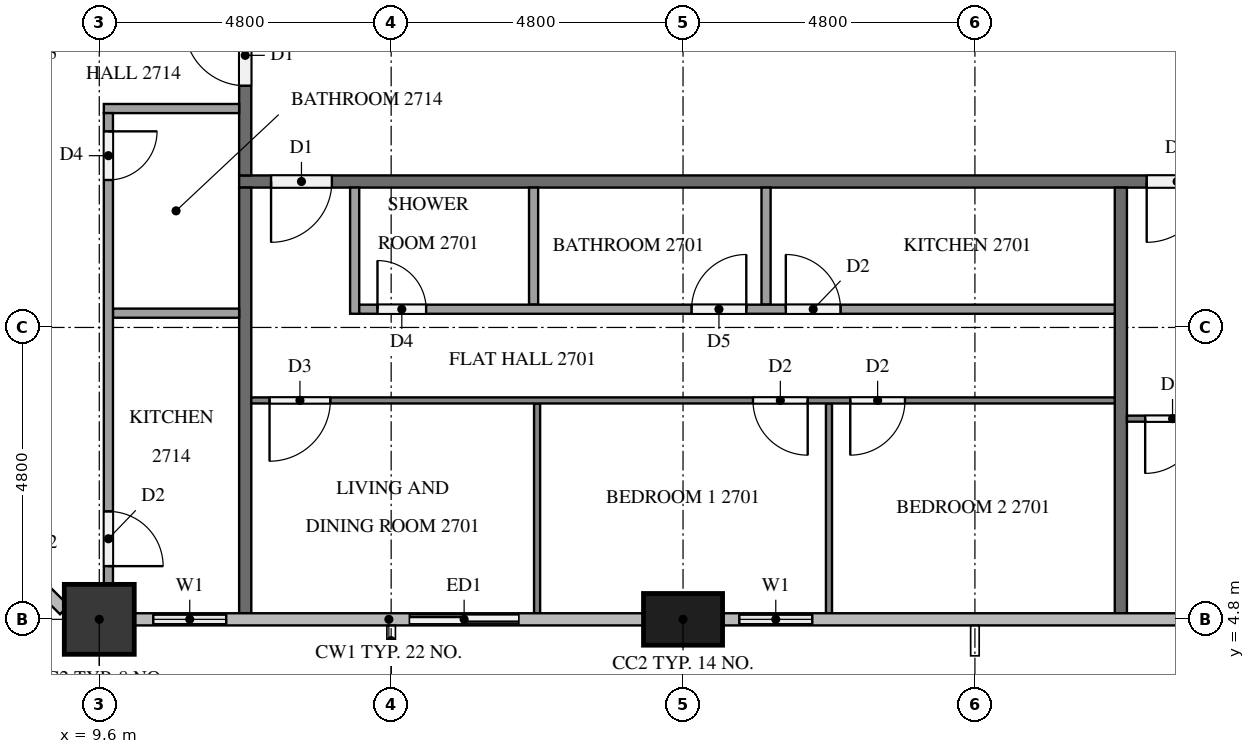
"""IFC4 building model, lengths in metres.
Left out: names, types, materials, properties, quantities, classifications, styles, units other than length and angle.
Written with IfcOpenShell. Run it as: python <this file> out.ifc"""

import sys

from ifc_helpers import new_model, si_unit, direction, frame, frame_2d, origin, origin_2d, place, context, subcontext, project, spatial, rectangle, extrude, element, fill, save


model = new_model("IFC4")
c1 = context("Model", 3, precision=1e-05, world=origin(), true_north=direction((0.0, 1.0)))
c2 = subcontext(c1, "Body", "Model", "MODEL_VIEW")
j1 = project(units=[si_unit("LENGTHUNIT", "METRE"), si_unit("PLANEANGLEUNIT", "RADIAN")], contexts=[c1])
p1 = place(None, origin())
s1 = spatial("IfcSite", under=j1, at=p1, CompositionType="ELEMENT")
p2 = place(p1, origin())
s2 = spatial("IfcBuilding", under=s1, at=p2, CompositionType="ELEMENT")
p3 = place(p2, frame((0.0, 0.0, 106.7)))
s3 = spatial("IfcBuildingStorey", under=s2, at=p3, CompositionType="ELEMENT", Elevation=106.7)
p4 = place(p3, frame((9.6, 4.8, 0.0), z_axis=(0.0, 0.0, 1.0), x_axis=(1.0, 0.0, 0.0)))
e1 = element("IfcColumn", 1, at=p4, inside=s3, PredefinedType="COLUMN", context=c2, shape_type="SweptSolid", body=[
    extrude(rectangle(XDim=1.15, YDim=1.15, at=origin_2d()), origin(), (0.0, 0.0, 1.0), 3.2),
])
p5 = place(p3, frame((19.2, 4.8, 0.0), z_axis=(0.0, 0.0, 1.0), x_axis=(1.0, 0.0, 0.0)))
e2 = element("IfcColumn", 2, at=p5, inside=s3, PredefinedType="COLUMN", context=c2, shape_type="SweptSolid", body=[
    extrude(rectangle(XDim=1.3, YDim=0.85, at=origin_2d()), origin(), (0.0, 0.0, 1.0), 3.2),
])
p6 = place(p3, frame((10.175, 4.8, 0.0), z_axis=(0.0, 0.0, 1.0), x_axis=(1.0, 0.0, 0.0)))
e3 = element("IfcWall", 3, at=p6, inside=s3, PredefinedType="SOLIDWALL", context=c2, shape_type="SweptSolid", body=[
    extrude(rectangle(XDim=1.825, YDim=0.15, at=frame_2d((0.913, 0.0))), origin(), (0.0, 0.0, 1.0), 3.2),
])
p7 = place(p6, frame((0.312, 0.0, 0.9)))
e4 = element("IfcOpeningElement", 4, at=p7, cuts=e3, PredefinedType="OPENING", context=c2, shape_type="SweptSolid", body=[
    extrude(rectangle(XDim=1.2, YDim=1.4, at=frame_2d((0.6, 0.7))), frame((0.0, 0.085, 0.0), z_axis=(0.0, -1.0, 0.0), x_axis=(1.0, 0.0, 0.0)), (0.0, 0.0, 1.0), 0.17),
])
p8 = place(p3, frame((14.4, 4.8, 0.0), z_axis=(0.0, 0.0, 1.0), x_axis=(1.0, 0.0, 0.0)))
e5 = element("IfcWall", 5, at=p8, inside=s3, PredefinedType="SOLIDWALL", context=c2, shape_type="SweptSolid", body=[
    extrude(rectangle(XDim=2.4, YDim=0.15, at=frame_2d((1.2, 0.0))), origin(), (0.0, 0.0, 1.0), 3.2),
])
p9 = place(p8, frame((0.3, 0.0, 0.0)))
e6 = element("IfcOpeningElement", 6, at=p9, cuts=e5, PredefinedType="OPENING", context=c2, shape_type="SweptSolid", body=[
    extrude(rectangle(XDim=1.8, YDim=2.4, at=frame_2d((0.9, 1.2))), frame((0.0, 0.085, 0.0), z_axis=(0.0, -1.0, 0.0), x_axis=(1.0, 0.0, 0.0)), (0.0, 0.0, 1.0), 0.17),
])
p10 = place(p3, frame((19.85, 4.8, 0.0), z_axis=(0.0, 0.0, 1.0), x_axis=(1.0, 0.0, 0.0)))
e7 = element("IfcWall", 7, at=p10, inside=s3, PredefinedType="SOLIDWALL", context=c2, shape_type="SweptSolid", body=[
    extrude(rectangle(XDim=1.75, YDim=0.15, at=frame_2d((0.875, 0.0))), origin(), (0.0, 0.0, 1.0), 3.2),
])
p11 = place(p10, frame((0.275, 0.0, 0.9)))
e8 = element("IfcOpeningElement", 8, at=p11, cuts=e7, PredefinedType="OPENING", context=c2, shape_type="SweptSolid", body=[
    extrude(rectangle(XDim=1.2, YDim=1.4, at=frame_2d((0.6, 0.7))), frame((0.0, 0.085, 0.0), z_axis=(0.0, -1.0, 0.0), x_axis=(1.0, 0.0, 0.0)), (0.0, 0.0, 1.0), 0.17),
])
p12 = place(p3, frame((50.5, 12.0, 0.0), z_axis=(0.0, 0.0, 1.0), x_axis=(-1.0, 0.0, 0.0)))
e9 = element("IfcWall", 9, at=p12, inside=s3, PredefinedType="PARTITIONING", context=c2, shape_type="SweptSolid", body=[
    extrude(rectangle(XDim=38.6, YDim=0.2, at=frame_2d((19.3, 0.0))), origin(), (0.0, 0.0, 1.0), 3.2),
])
p13 = place(p12, frame((37.075, 0.0, 0.0)))
e10 = element("IfcOpeningElement", 10, at=p13, cuts=e9, PredefinedType="OPENING", context=c2, shape_type="SweptSolid", body=[
    extrude(rectangle(XDim=1.0, YDim=2.1, at=frame_2d((0.5, 1.05))), frame((0.0, 0.11, 0.0), z_axis=(0.0, -1.0, 0.0), x_axis=(1.0, 0.0, 0.0)), (0.0, 0.0, 1.0), 0.22),
])
p14 = place(p12, frame((22.675, 0.0, 0.0)))
e11 = element("IfcOpeningElement", 11, at=p14, cuts=e9, PredefinedType="OPENING", context=c2, shape_type="SweptSolid", body=[
    extrude(rectangle(XDim=1.0, YDim=2.1, at=frame_2d((0.5, 1.05))), frame((0.0, 0.11, 0.0), z_axis=(0.0, -1.0, 0.0), x_axis=(1.0, 0.0, 0.0)), (0.0, 0.0, 1.0), 0.22),
])
p15 = place(p12, frame((0.525, 0.0, 0.0)))
e12 = element("IfcOpeningElement", 12, at=p15, cuts=e9, PredefinedType="OPENING", context=c2, shape_type="SweptSolid", body=[
    extrude(rectangle(XDim=1.0, YDim=2.1, at=frame_2d((0.5, 1.05))), frame((0.0, 0.11, 0.0), z_axis=(0.0, -1.0, 0.0), x_axis=(1.0, 0.0, 0.0)), (0.0, 0.0, 1.0), 0.22),
])
p16 = place(p3, frame((12.0, 12.1, 0.0), z_axis=(0.0, 0.0, 1.0), x_axis=(0.0, 1.0, 0.0)))
e13 = element("IfcWall", 13, at=p16, inside=s3, PredefinedType="PARTITIONING", context=c2, shape_type="SweptSolid", body=[
    extrude(rectangle(XDim=2.8, YDim=0.2, at=frame_2d((1.4, 0.0))), origin(), (0.0, 0.0, 1.0), 3.2),
])
p17 = place(p16, frame((1.475, 0.0, 0.0)))
e14 = element("IfcOpeningElement", 14, at=p17, cuts=e13, PredefinedType="OPENING", context=c2, shape_type="SweptSolid", body=[
    extrude(rectangle(XDim=1.0, YDim=2.1, at=frame_2d((0.5, 1.05))), frame((0.0, 0.11, 0.0), z_axis=(0.0, -1.0, 0.0), x_axis=(1.0, 0.0, 0.0)), (0.0, 0.0, 1.0), 0.22),
])
for number, where, z_axis, x_axis in (
    (15, (26.4, 11.9, 0.0), (0.0, 0.0, 1.0), (0.0, -1.0, 0.0)),
    (16, (12.0, 4.9, 0.0), (0.0, 0.0, 1.0), (0.0, 1.0, 0.0)),
):
    element("IfcWall", number, at=place(p3, frame(where, z_axis=z_axis, x_axis=x_axis)), inside=s3, PredefinedType="PARTITIONING", context=c2, shape_type="SweptSolid", body=[
        extrude(rectangle(XDim=7.0, YDim=0.2, at=frame_2d((3.5, 0.0))), origin(), (0.0, 0.0, 1.0), 3.2),
    ])
for number, where, z_axis, x_axis in (
    (17, (16.8, 8.35, 0.0), (0.0, 0.0, 1.0), (0.0, -1.0, 0.0)),
    (18, (21.6, 8.35, 0.0), (0.0, 0.0, 1.0), (0.0, -1.0, 0.0)),
):
    element("IfcWall", number, at=place(p3, frame(where, z_axis=z_axis, x_axis=x_axis)), inside=s3, PredefinedType="PARTITIONING", context=c2, shape_type="SweptSolid", body=[
        extrude(rectangle(XDim=3.45, YDim=0.1, at=frame_2d((1.725, 0.0))), origin(), (0.0, 0.0, 1.0), 3.2),
    ])
p18 = place(p3, frame((26.3, 8.4, 0.0), z_axis=(0.0, 0.0, 1.0), x_axis=(-1.0, 0.0, 0.0)))
e19 = element("IfcWall", 19, at=p18, inside=s3, PredefinedType="PARTITIONING", context=c2, shape_type="SweptSolid", body=[
    extrude(rectangle(XDim=14.2, YDim=0.1, at=frame_2d((7.1, 0.0))), origin(), (0.0, 0.0, 1.0), 3.2),
])
p19 = place(p18, frame((12.9, 0.0, 0.0)))
e20 = element("IfcOpeningElement", 20, at=p19, cuts=e19, PredefinedType="OPENING", context=c2, shape_type="SweptSolid", body=[
    extrude(rectangle(XDim=1.0, YDim=2.1, at=frame_2d((0.5, 1.05))), frame((0.0, 0.06, 0.0), z_axis=(0.0, -1.0, 0.0), x_axis=(1.0, 0.0, 0.0)), (0.0, 0.0, 1.0), 0.12),
])
p20 = place(p18, frame((5.05, 0.0, 0.0)))
e21 = element("IfcOpeningElement", 21, at=p20, cuts=e19, PredefinedType="OPENING", context=c2, shape_type="SweptSolid", body=[
    extrude(rectangle(XDim=0.9, YDim=2.1, at=frame_2d((0.45, 1.05))), frame((0.0, 0.06, 0.0), z_axis=(0.0, -1.0, 0.0), x_axis=(1.0, 0.0, 0.0)), (0.0, 0.0, 1.0), 0.12),
])
p21 = place(p18, frame((3.45, 0.0, 0.0)))
e22 = element("IfcOpeningElement", 22, at=p21, cuts=e19, PredefinedType="OPENING", context=c2, shape_type="SweptSolid", body=[
    extrude(rectangle(XDim=0.9, YDim=2.1, at=frame_2d((0.45, 1.05))), frame((0.0, 0.06, 0.0), z_axis=(0.0, -1.0, 0.0), x_axis=(1.0, 0.0, 0.0)), (0.0, 0.0, 1.0), 0.12),
])
for number, where, z_axis, x_axis in (
    (23, (16.742, 11.9, 0.0), (0.0, 0.0, 1.0), (0.0, -1.0, 0.0)),
    (24, (20.565, 11.9, 0.0), (0.0, 0.0, 1.0), (0.0, -1.0, 0.0)),
):
    element("IfcWall", number, at=place(p3, frame(where, z_axis=z_axis, x_axis=x_axis)), inside=s3, PredefinedType="PARTITIONING", context=c2, shape_type="SweptSolid", body=[
        extrude(rectangle(XDim=1.925, YDim=0.15, at=frame_2d((0.962, 0.0))), origin(), (0.0, 0.0, 1.0), 3.2),
    ])
p22 = place(p3, frame((13.8, 11.9, 0.0), z_axis=(0.0, 0.0, 1.0), x_axis=(0.0, -1.0, 0.0)))
e25 = element("IfcWall", 25, at=p22, inside=s3, PredefinedType="PARTITIONING", context=c2, shape_type="SweptSolid", body=[
    extrude(rectangle(XDim=2.075, YDim=0.15, at=frame_2d((1.038, 0.0))), origin(), (0.0, 0.0, 1.0), 3.2),
])
p23 = place(p3, frame((13.875, 9.9, 0.0), z_axis=(0.0, 0.0, 1.0), x_axis=(1.0, 0.0, 0.0)))
e26 = element("IfcWall", 26, at=p23, inside=s3, PredefinedType="PARTITIONING", context=c2, shape_type="SweptSolid", body=[
    extrude(rectangle(XDim=12.425, YDim=0.15, at=frame_2d((6.212, 0.0))), origin(), (0.0, 0.0, 1.0), 3.2),
])
p24 = place(p23, frame((0.3, 0.0, 0.0)))
e27 = element("IfcOpeningElement", 27, at=p24, cuts=e26, PredefinedType="OPENING", context=c2, shape_type="SweptSolid", body=[
    extrude(rectangle(XDim=0.8, YDim=2.1, at=frame_2d((0.4, 1.05))), frame((0.0, 0.085, 0.0), z_axis=(0.0, -1.0, 0.0), x_axis=(1.0, 0.0, 0.0)), (0.0, 0.0, 1.0), 0.17),
])
p25 = place(p23, frame((5.465, 0.0, 0.0)))
e28 = element("IfcOpeningElement", 28, at=p25, cuts=e26, PredefinedType="OPENING", context=c2, shape_type="SweptSolid", body=[
    extrude(rectangle(XDim=0.9, YDim=2.1, at=frame_2d((0.45, 1.05))), frame((0.0, 0.085, 0.0), z_axis=(0.0, -1.0, 0.0), x_axis=(1.0, 0.0, 0.0)), (0.0, 0.0, 1.0), 0.17),
])
p26 = place(p23, frame((7.015, 0.0, 0.0)))
e29 = element("IfcOpeningElement", 29, at=p26, cuts=e26, PredefinedType="OPENING", context=c2, shape_type="SweptSolid", body=[
    extrude(rectangle(XDim=0.9, YDim=2.1, at=frame_2d((0.45, 1.05))), frame((0.0, 0.085, 0.0), z_axis=(0.0, -1.0, 0.0), x_axis=(1.0, 0.0, 0.0)), (0.0, 0.0, 1.0), 0.17),
])
p27 = place(p3, frame((40.7, 8.1, 0.0), z_axis=(0.0, 0.0, 1.0), x_axis=(-1.0, 0.0, 0.0)))
e30 = element("IfcWall", 30, at=p27, inside=s3, PredefinedType="PARTITIONING", context=c2, shape_type="SweptSolid", body=[
    extrude(rectangle(XDim=14.2, YDim=0.1, at=frame_2d((7.1, 0.0))), origin(), (0.0, 0.0, 1.0), 3.2),
])
p28 = place(p27, frame((13.0, 0.0, 0.0)))
e31 = element("IfcOpeningElement", 31, at=p28, cuts=e30, PredefinedType="OPENING", context=c2, shape_type="SweptSolid", body=[
    extrude(rectangle(XDim=0.9, YDim=2.1, at=frame_2d((0.45, 1.05))), frame((0.0, 0.06, 0.0), z_axis=(0.0, -1.0, 0.0), x_axis=(1.0, 0.0, 0.0)), (0.0, 0.0, 1.0), 0.12),
])
p29 = place(p27, frame((5.05, 0.0, 0.0)))
e32 = element("IfcOpeningElement", 32, at=p29, cuts=e30, PredefinedType="OPENING", context=c2, shape_type="SweptSolid", body=[
    extrude(rectangle(XDim=1.0, YDim=2.1, at=frame_2d((0.5, 1.05))), frame((0.0, 0.06, 0.0), z_axis=(0.0, -1.0, 0.0), x_axis=(1.0, 0.0, 0.0)), (0.0, 0.0, 1.0), 0.12),
])
p30 = place(p27, frame((3.45, 0.0, 0.0)))
e33 = element("IfcOpeningElement", 33, at=p30, cuts=e30, PredefinedType="OPENING", context=c2, shape_type="SweptSolid", body=[
    extrude(rectangle(XDim=0.9, YDim=2.1, at=frame_2d((0.45, 1.05))), frame((0.0, 0.06, 0.0), z_axis=(0.0, -1.0, 0.0), x_axis=(1.0, 0.0, 0.0)), (0.0, 0.0, 1.0), 0.12),
])
p31 = place(p3, frame((11.9, 9.835, 0.0), z_axis=(0.0, 0.0, 1.0), x_axis=(-1.0, 0.0, 0.0)))
e34 = element("IfcWall", 34, at=p31, inside=s3, PredefinedType="PARTITIONING", context=c2, shape_type="SweptSolid", body=[
    extrude(rectangle(XDim=2.075, YDim=0.15, at=frame_2d((1.038, 0.0))), origin(), (0.0, 0.0, 1.0), 3.2),
])
p32 = place(p3, frame((11.9, 13.2, 0.0), z_axis=(0.0, 0.0, 1.0), x_axis=(-1.0, 0.0, 0.0)))
e35 = element("IfcWall", 35, at=p32, inside=s3, PredefinedType="PARTITIONING", context=c2, shape_type="SweptSolid", body=[
    extrude(rectangle(XDim=2.225, YDim=0.15, at=frame_2d((1.112, 0.0))), origin(), (0.0, 0.0, 1.0), 3.2),
])
p33 = place(p3, frame((9.75, 13.125, 0.0), z_axis=(0.0, 0.0, 1.0), x_axis=(0.0, -1.0, 0.0)))
e36 = element("IfcWall", 36, at=p33, inside=s3, PredefinedType="PARTITIONING", context=c2, shape_type="SweptSolid", body=[
    extrude(rectangle(XDim=7.75, YDim=0.15, at=frame_2d((3.875, 0.0))), origin(), (0.0, 0.0, 1.0), 3.2),
])
p34 = place(p33, frame((0.3, 0.0, 0.0)))
e37 = element("IfcOpeningElement", 37, at=p34, cuts=e36, PredefinedType="OPENING", context=c2, shape_type="SweptSolid", body=[
    extrude(rectangle(XDim=0.8, YDim=2.1, at=frame_2d((0.4, 1.05))), frame((0.0, 0.085, 0.0), z_axis=(0.0, -1.0, 0.0), x_axis=(1.0, 0.0, 0.0)), (0.0, 0.0, 1.0), 0.17),
])
p35 = place(p33, frame((6.55, 0.0, 0.0)))
e38 = element("IfcOpeningElement", 38, at=p35, cuts=e36, PredefinedType="OPENING", context=c2, shape_type="SweptSolid", body=[
    extrude(rectangle(XDim=0.9, YDim=2.1, at=frame_2d((0.45, 1.05))), frame((0.0, 0.085, 0.0), z_axis=(0.0, -1.0, 0.0), x_axis=(1.0, 0.0, 0.0)), (0.0, 0.0, 1.0), 0.17),
])
p36 = place(p7, origin())
e39 = element("IfcWindow", 39, at=p36, inside=s3, PartitioningType="SINGLE_PANEL", PredefinedType="WINDOW", context=c2, shape_type="SweptSolid", body=[
    extrude(rectangle(XDim=1.2, YDim=1.4, at=frame_2d((0.6, 0.7))), frame((0.0, 0.03, 0.0), z_axis=(0.0, -1.0, 0.0), x_axis=(1.0, 0.0, 0.0)), (0.0, 0.0, 1.0), 0.06),
])
fill(e4, e39)
p37 = place(p9, origin())
e40 = element("IfcDoor", 40, at=p37, inside=s3, OperationType="SLIDING_TO_LEFT", PredefinedType="DOOR", context=c2, shape_type="SweptSolid", body=[
    extrude(rectangle(XDim=1.8, YDim=2.4, at=frame_2d((0.9, 1.2))), frame((0.0, 0.025, 0.0), z_axis=(0.0, -1.0, 0.0), x_axis=(1.0, 0.0, 0.0)), (0.0, 0.0, 1.0), 0.05),
])
fill(e6, e40)
p38 = place(p11, origin())
e41 = element("IfcWindow", 41, at=p38, inside=s3, PartitioningType="SINGLE_PANEL", PredefinedType="WINDOW", context=c2, shape_type="SweptSolid", body=[
    extrude(rectangle(XDim=1.2, YDim=1.4, at=frame_2d((0.6, 0.7))), frame((0.0, 0.03, 0.0), z_axis=(0.0, -1.0, 0.0), x_axis=(1.0, 0.0, 0.0)), (0.0, 0.0, 1.0), 0.06),
])
fill(e8, e41)
p39 = place(p13, origin())
e42 = element("IfcDoor", 42, at=p39, inside=s3, OperationType="SINGLE_SWING_RIGHT", PredefinedType="DOOR", context=c2, shape_type="SweptSolid", body=[
    extrude(rectangle(XDim=1.0, YDim=2.1, at=frame_2d((0.5, 1.05))), frame((0.0, 0.025, 0.0), z_axis=(0.0, -1.0, 0.0), x_axis=(1.0, 0.0, 0.0)), (0.0, 0.0, 1.0), 0.05),
])
fill(e10, e42)
p40 = place(p14, origin())
e43 = element("IfcDoor", 43, at=p40, inside=s3, OperationType="SINGLE_SWING_RIGHT", PredefinedType="DOOR", context=c2, shape_type="SweptSolid", body=[
    extrude(rectangle(XDim=1.0, YDim=2.1, at=frame_2d((0.5, 1.05))), frame((0.0, 0.025, 0.0), z_axis=(0.0, -1.0, 0.0), x_axis=(1.0, 0.0, 0.0)), (0.0, 0.0, 1.0), 0.05),
])
fill(e11, e43)
p41 = place(p17, origin())
e44 = element("IfcDoor", 44, at=p41, inside=s3, OperationType="SINGLE_SWING_RIGHT", PredefinedType="DOOR", context=c2, shape_type="SweptSolid", body=[
    extrude(rectangle(XDim=1.0, YDim=2.1, at=frame_2d((0.5, 1.05))), frame((0.0, 0.025, 0.0), z_axis=(0.0, -1.0, 0.0), x_axis=(1.0, 0.0, 0.0)), (0.0, 0.0, 1.0), 0.05),
])
fill(e14, e44)
p42 = place(p19, origin())
e45 = element("IfcDoor", 45, at=p42, inside=s3, OperationType="SINGLE_SWING_RIGHT", PredefinedType="DOOR", context=c2, shape_type="SweptSolid", body=[
    extrude(rectangle(XDim=1.0, YDim=2.1, at=frame_2d((0.5, 1.05))), frame((0.0, 0.025, 0.0), z_axis=(0.0, -1.0, 0.0), x_axis=(1.0, 0.0, 0.0)), (0.0, 0.0, 1.0), 0.05),
])
fill(e20, e45)
p43 = place(p20, origin())
e46 = element("IfcDoor", 46, at=p43, inside=s3, OperationType="SINGLE_SWING_LEFT", PredefinedType="DOOR", context=c2, shape_type="SweptSolid", body=[
    extrude(rectangle(XDim=0.9, YDim=2.1, at=frame_2d((0.45, 1.05))), frame((0.0, 0.025, 0.0), z_axis=(0.0, -1.0, 0.0), x_axis=(1.0, 0.0, 0.0)), (0.0, 0.0, 1.0), 0.05),
])
fill(e21, e46)
p44 = place(p21, origin())
e47 = element("IfcDoor", 47, at=p44, inside=s3, OperationType="SINGLE_SWING_RIGHT", PredefinedType="DOOR", context=c2, shape_type="SweptSolid", body=[
    extrude(rectangle(XDim=0.9, YDim=2.1, at=frame_2d((0.45, 1.05))), frame((0.0, 0.025, 0.0), z_axis=(0.0, -1.0, 0.0), x_axis=(1.0, 0.0, 0.0)), (0.0, 0.0, 1.0), 0.05),
])
fill(e22, e47)
p45 = place(p24, origin())
e48 = element("IfcDoor", 48, at=p45, inside=s3, OperationType="SINGLE_SWING_LEFT", PredefinedType="DOOR", context=c2, shape_type="SweptSolid", body=[
    extrude(rectangle(XDim=0.8, YDim=2.1, at=frame_2d((0.4, 1.05))), frame((0.0, 0.025, 0.0), z_axis=(0.0, -1.0, 0.0), x_axis=(1.0, 0.0, 0.0)), (0.0, 0.0, 1.0), 0.05),
])
fill(e27, e48)
p46 = place(p25, origin())
e49 = element("IfcDoor", 49, at=p46, inside=s3, OperationType="SINGLE_SWING_RIGHT", PredefinedType="DOOR", context=c2, shape_type="SweptSolid", body=[
    extrude(rectangle(XDim=0.9, YDim=2.1, at=frame_2d((0.45, 1.05))), frame((0.0, 0.025, 0.0), z_axis=(0.0, -1.0, 0.0), x_axis=(1.0, 0.0, 0.0)), (0.0, 0.0, 1.0), 0.05),
])
fill(e28, e49)
p47 = place(p26, origin())
e50 = element("IfcDoor", 50, at=p47, inside=s3, OperationType="SINGLE_SWING_LEFT", PredefinedType="DOOR", context=c2, shape_type="SweptSolid", body=[
    extrude(rectangle(XDim=0.9, YDim=2.1, at=frame_2d((0.45, 1.05))), frame((0.0, 0.025, 0.0), z_axis=(0.0, -1.0, 0.0), x_axis=(1.0, 0.0, 0.0)), (0.0, 0.0, 1.0), 0.05),
])
fill(e29, e50)
p48 = place(p28, origin())
e51 = element("IfcDoor", 51, at=p48, inside=s3, OperationType="SINGLE_SWING_RIGHT", PredefinedType="DOOR", context=c2, shape_type="SweptSolid", body=[
    extrude(rectangle(XDim=0.9, YDim=2.1, at=frame_2d((0.45, 1.05))), frame((0.0, 0.025, 0.0), z_axis=(0.0, -1.0, 0.0), x_axis=(1.0, 0.0, 0.0)), (0.0, 0.0, 1.0), 0.05),
])
fill(e31, e51)
p49 = place(p34, origin())
e52 = element("IfcDoor", 52, at=p49, inside=s3, OperationType="SINGLE_SWING_LEFT", PredefinedType="DOOR", context=c2, shape_type="SweptSolid", body=[
    extrude(rectangle(XDim=0.8, YDim=2.1, at=frame_2d((0.4, 1.05))), frame((0.0, 0.025, 0.0), z_axis=(0.0, -1.0, 0.0), x_axis=(1.0, 0.0, 0.0)), (0.0, 0.0, 1.0), 0.05),
])
fill(e37, e52)
p50 = place(p35, origin())
e53 = element("IfcDoor", 53, at=p50, inside=s3, OperationType="SINGLE_SWING_RIGHT", PredefinedType="DOOR", context=c2, shape_type="SweptSolid", body=[
    extrude(rectangle(XDim=0.9, YDim=2.1, at=frame_2d((0.45, 1.05))), frame((0.0, 0.025, 0.0), z_axis=(0.0, -1.0, 0.0), x_axis=(1.0, 0.0, 0.0)), (0.0, 0.0, 1.0), 0.05),
])
fill(e38, e53)
save(model, sys.argv[1])
